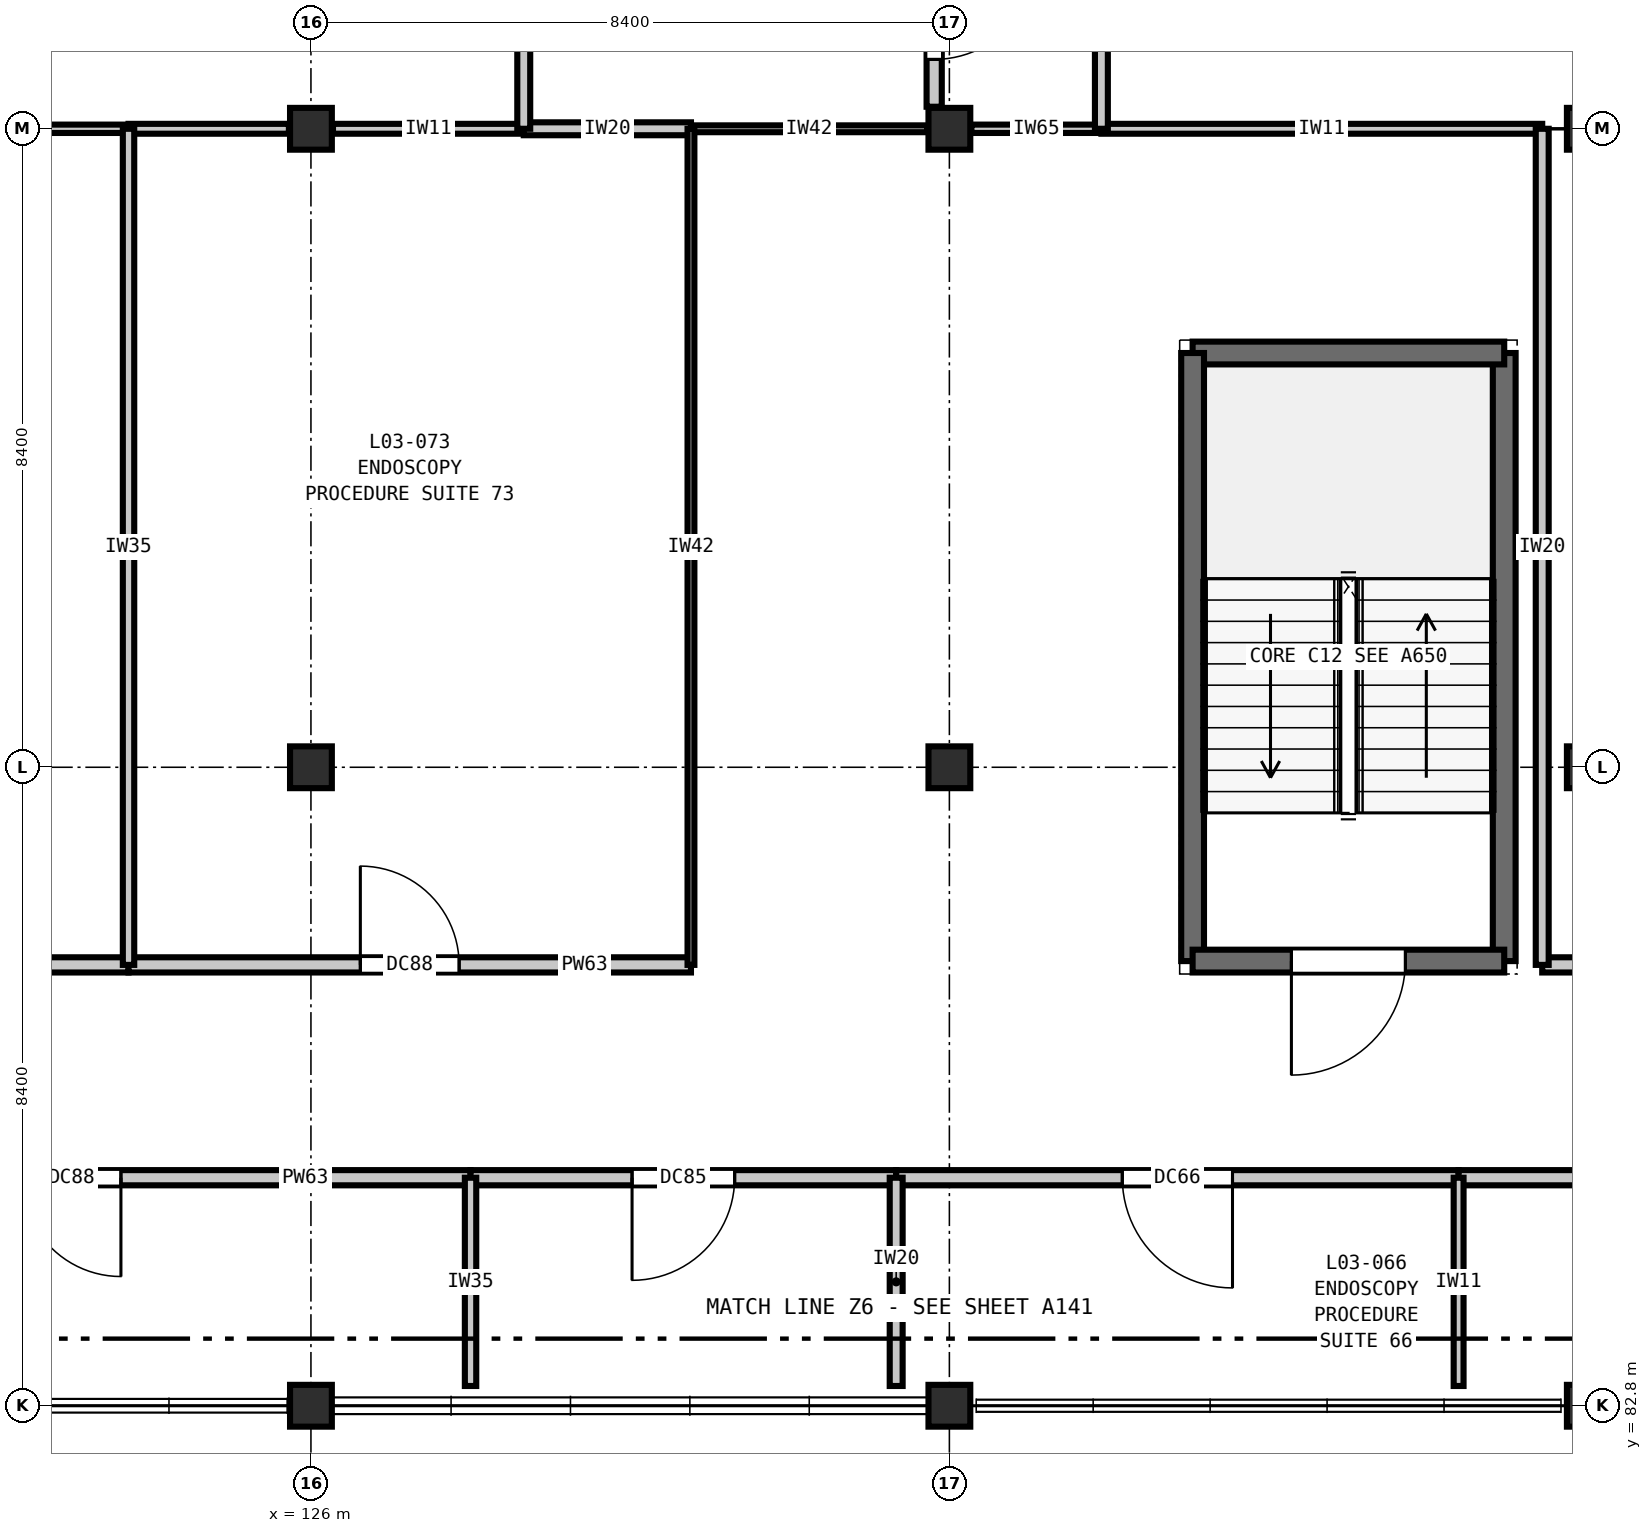
"""IFC4 building model, lengths in metres.
Left out: names, types, materials, properties, quantities, classifications, styles, units other than length and angle.
Written with IfcOpenShell. Run it as: python <this file> out.ifc"""

import sys

from ifc_helpers import new_model, si_unit, direction, frame, frame_2d, origin, origin_2d, place, context, subcontext, project, spatial, rectangle, extrude, element, fill, save


model = new_model("IFC4")
c1 = context("Model", 3, precision=1e-05, world=origin(), true_north=direction((0.0, 1.0)))
c2 = subcontext(c1, "Body", "Model", "MODEL_VIEW")
j1 = project(units=[si_unit("LENGTHUNIT", "METRE"), si_unit("PLANEANGLEUNIT", "RADIAN")], contexts=[c1])
p1 = place(None, origin())
s1 = spatial("IfcSite", under=j1, at=p1, CompositionType="ELEMENT")
p2 = place(p1, origin())
s2 = spatial("IfcBuilding", under=s1, at=p2, CompositionType="ELEMENT")
p3 = place(p2, frame((0.0, 0.0, 16.2)))
s3 = spatial("IfcBuildingStorey", under=s2, at=p3, CompositionType="ELEMENT", Elevation=16.2)
for number, where, z_axis, x_axis in (
    (1, (126.0, 82.8, 0.0), (0.0, 0.0, 1.0), (1.0, 0.0, 0.0)),
    (2, (126.0, 91.2, 0.0), (0.0, 0.0, 1.0), (1.0, 0.0, 0.0)),
    (3, (126.0, 99.6, 0.0), (0.0, 0.0, 1.0), (1.0, 0.0, 0.0)),
    (4, (134.4, 82.8, 0.0), (0.0, 0.0, 1.0), (1.0, 0.0, 0.0)),
    (5, (134.4, 91.2, 0.0), (0.0, 0.0, 1.0), (1.0, 0.0, 0.0)),
    (6, (134.4, 99.6, 0.0), (0.0, 0.0, 1.0), (1.0, 0.0, 0.0)),
    (7, (142.8, 82.8, 0.0), (0.0, 0.0, 1.0), (1.0, 0.0, 0.0)),
    (8, (142.8, 91.2, 0.0), (0.0, 0.0, 1.0), (1.0, 0.0, 0.0)),
    (9, (142.8, 99.6, 0.0), (0.0, 0.0, 1.0), (1.0, 0.0, 0.0)),
):
    element("IfcColumn", number, at=place(p3, frame(where, z_axis=z_axis, x_axis=x_axis)), inside=s3, PredefinedType="COLUMN", context=c2, shape_type="SweptSolid", body=[
        extrude(rectangle(XDim=0.55, YDim=0.55, at=origin_2d()), origin(), (0.0, 0.0, 1.0), 4.2),
    ])
p4 = place(p3, frame((141.7, 88.65, 0.0), z_axis=(0.0, 0.0, 1.0), x_axis=(0.0, 1.0, 0.0)))
e10 = element("IfcWall", 10, at=p4, inside=s3, PredefinedType="SHEAR", context=c2, shape_type="SweptSolid", body=[
    extrude(rectangle(XDim=8.0, YDim=0.3, at=frame_2d((4.0, 0.0))), origin(), (0.0, 0.0, 1.0), 4.2),
])
p5 = place(p3, frame((141.7, 96.65, 0.0), z_axis=(0.0, 0.0, 1.0), x_axis=(-1.0, 0.0, 0.0)))
e11 = element("IfcWall", 11, at=p5, inside=s3, PredefinedType="SHEAR", context=c2, shape_type="SweptSolid", body=[
    extrude(rectangle(XDim=4.1, YDim=0.3, at=frame_2d((2.05, 0.0))), origin(), (0.0, 0.0, 1.0), 4.2),
])
p6 = place(p3, frame((137.6, 96.65, 0.0), z_axis=(0.0, 0.0, 1.0), x_axis=(0.0, -1.0, 0.0)))
e12 = element("IfcWall", 12, at=p6, inside=s3, PredefinedType="SHEAR", context=c2, shape_type="SweptSolid", body=[
    extrude(rectangle(XDim=8.0, YDim=0.3, at=frame_2d((4.0, 0.0))), origin(), (0.0, 0.0, 1.0), 4.2),
])
p7 = place(p3, frame((137.6, 88.65, 0.0), z_axis=(0.0, 0.0, 1.0), x_axis=(1.0, 0.0, 0.0)))
e13 = element("IfcWall", 13, at=p7, inside=s3, PredefinedType="SHEAR", context=c2, shape_type="SweptSolid", body=[
    extrude(rectangle(XDim=4.1, YDim=0.3, at=frame_2d((2.05, 0.0))), origin(), (0.0, 0.0, 1.0), 4.2),
])
p8 = place(p7, frame((1.3, 0.0, 0.0)))
e14 = element("IfcOpeningElement", 14, at=p8, cuts=e13, PredefinedType="OPENING", context=c2, shape_type="SweptSolid", body=[
    extrude(rectangle(XDim=1.5, YDim=2.2, at=frame_2d((0.75, 1.1))), frame((0.0, 0.16, 0.0), z_axis=(0.0, -1.0, 0.0), x_axis=(1.0, 0.0, 0.0)), (0.0, 0.0, 1.0), 0.32),
])
p9 = place(p3, frame((117.6, 85.8, 0.0), z_axis=(0.0, 0.0, 1.0), x_axis=(1.0, 0.0, 0.0)))
e15 = element("IfcWall", 15, at=p9, inside=s3, PredefinedType="PARTITIONING", context=c2, shape_type="SweptSolid", body=[
    extrude(rectangle(XDim=10.5, YDim=0.2, at=frame_2d((5.25, 0.0))), origin(), (0.0, 0.0, 1.0), 3.89),
])
p10 = place(p9, frame((4.6, 0.0, 0.0)))
e16 = element("IfcOpeningElement", 16, at=p10, cuts=e15, PredefinedType="OPENING", context=c2, shape_type="SweptSolid", body=[
    extrude(rectangle(XDim=1.3, YDim=2.2, at=frame_2d((0.65, 1.1))), frame((0.0, 0.11, 0.0), z_axis=(0.0, -1.0, 0.0), x_axis=(1.0, 0.0, 0.0)), (0.0, 0.0, 1.0), 0.22),
])
p11 = place(p3, frame((128.1, 85.8, 0.0), z_axis=(0.0, 0.0, 1.0), x_axis=(1.0, 0.0, 0.0)))
e17 = element("IfcWall", 17, at=p11, inside=s3, PredefinedType="PARTITIONING", context=c2, shape_type="SweptSolid", body=[
    extrude(rectangle(XDim=5.6, YDim=0.2, at=frame_2d((2.8, 0.0))), origin(), (0.0, 0.0, 1.0), 3.89),
])
p12 = place(p11, frame((2.125, 0.0, 0.0)))
e18 = element("IfcOpeningElement", 18, at=p12, cuts=e17, PredefinedType="OPENING", context=c2, shape_type="SweptSolid", body=[
    extrude(rectangle(XDim=1.35, YDim=2.2, at=frame_2d((0.675, 1.1))), frame((0.0, 0.11, 0.0), z_axis=(0.0, -1.0, 0.0), x_axis=(1.0, 0.0, 0.0)), (0.0, 0.0, 1.0), 0.22),
])
p13 = place(p3, frame((133.7, 85.8, 0.0), z_axis=(0.0, 0.0, 1.0), x_axis=(1.0, 0.0, 0.0)))
e19 = element("IfcWall", 19, at=p13, inside=s3, PredefinedType="PARTITIONING", context=c2, shape_type="SweptSolid", body=[
    extrude(rectangle(XDim=7.4, YDim=0.2, at=frame_2d((3.7, 0.0))), origin(), (0.0, 0.0, 1.0), 3.89),
])
p14 = place(p13, frame((2.975, 0.0, 0.0)))
e20 = element("IfcOpeningElement", 20, at=p14, cuts=e19, PredefinedType="OPENING", context=c2, shape_type="SweptSolid", body=[
    extrude(rectangle(XDim=1.45, YDim=2.25, at=frame_2d((0.725, 1.125))), frame((0.0, 0.11, 0.0), z_axis=(0.0, -1.0, 0.0), x_axis=(1.0, 0.0, 0.0)), (0.0, 0.0, 1.0), 0.22),
])
p15 = place(p3, frame((141.1, 85.8, 0.0), z_axis=(0.0, 0.0, 1.0), x_axis=(1.0, 0.0, 0.0)))
e21 = element("IfcWall", 21, at=p15, inside=s3, PredefinedType="PARTITIONING", context=c2, shape_type="SweptSolid", body=[
    extrude(rectangle(XDim=10.1, YDim=0.2, at=frame_2d((5.05, 0.0))), origin(), (0.0, 0.0, 1.0), 3.89),
])
p16 = place(p15, frame((4.275, 0.0, 0.0)))
e22 = element("IfcOpeningElement", 22, at=p16, cuts=e21, PredefinedType="OPENING", context=c2, shape_type="SweptSolid", body=[
    extrude(rectangle(XDim=1.55, YDim=2.25, at=frame_2d((0.775, 1.125))), frame((0.0, 0.11, 0.0), z_axis=(0.0, -1.0, 0.0), x_axis=(1.0, 0.0, 0.0)), (0.0, 0.0, 1.0), 0.22),
])
p17 = place(p3, frame((118.0, 88.6, 0.0), z_axis=(0.0, 0.0, 1.0), x_axis=(1.0, 0.0, 0.0)))
e23 = element("IfcWall", 23, at=p17, inside=s3, PredefinedType="PARTITIONING", context=c2, shape_type="SweptSolid", body=[
    extrude(rectangle(XDim=5.6, YDim=0.2, at=frame_2d((2.8, 0.0))), origin(), (0.0, 0.0, 1.0), 3.89),
])
p18 = place(p17, frame((2.175, 0.0, 0.0)))
e24 = element("IfcOpeningElement", 24, at=p18, cuts=e23, PredefinedType="OPENING", context=c2, shape_type="SweptSolid", body=[
    extrude(rectangle(XDim=1.25, YDim=2.15, at=frame_2d((0.625, 1.075))), frame((0.0, 0.11, 0.0), z_axis=(0.0, -1.0, 0.0), x_axis=(1.0, 0.0, 0.0)), (0.0, 0.0, 1.0), 0.22),
])
p19 = place(p3, frame((123.6, 88.6, 0.0), z_axis=(0.0, 0.0, 1.0), x_axis=(1.0, 0.0, 0.0)))
e25 = element("IfcWall", 25, at=p19, inside=s3, PredefinedType="PARTITIONING", context=c2, shape_type="SweptSolid", body=[
    extrude(rectangle(XDim=7.4, YDim=0.2, at=frame_2d((3.7, 0.0))), origin(), (0.0, 0.0, 1.0), 3.89),
])
p20 = place(p19, frame((3.05, 0.0, 0.0)))
e26 = element("IfcOpeningElement", 26, at=p20, cuts=e25, PredefinedType="OPENING", context=c2, shape_type="SweptSolid", body=[
    extrude(rectangle(XDim=1.3, YDim=2.2, at=frame_2d((0.65, 1.1))), frame((0.0, 0.11, 0.0), z_axis=(0.0, -1.0, 0.0), x_axis=(1.0, 0.0, 0.0)), (0.0, 0.0, 1.0), 0.22),
])
p21 = place(p3, frame((142.2, 88.6, 0.0), z_axis=(0.0, 0.0, 1.0), x_axis=(1.0, 0.0, 0.0)))
e27 = element("IfcWall", 27, at=p21, inside=s3, PredefinedType="PARTITIONING", context=c2, shape_type="SweptSolid", body=[
    extrude(rectangle(XDim=9.0, YDim=0.2, at=frame_2d((4.5, 0.0))), origin(), (0.0, 0.0, 1.0), 3.89),
])
p22 = place(p21, frame((3.825, 0.0, 0.0)))
e28 = element("IfcOpeningElement", 28, at=p22, cuts=e27, PredefinedType="OPENING", context=c2, shape_type="SweptSolid", body=[
    extrude(rectangle(XDim=1.35, YDim=2.2, at=frame_2d((0.675, 1.1))), frame((0.0, 0.11, 0.0), z_axis=(0.0, -1.0, 0.0), x_axis=(1.0, 0.0, 0.0)), (0.0, 0.0, 1.0), 0.22),
])
p23 = place(p3, frame((120.4, 99.6, 0.0), z_axis=(0.0, 0.0, 1.0), x_axis=(1.0, 0.0, 0.0)))
e29 = element("IfcWall", 29, at=p23, inside=s3, PredefinedType="PARTITIONING", context=c2, shape_type="SweptSolid", body=[
    extrude(rectangle(XDim=3.2, YDim=0.11, at=frame_2d((1.6, 0.0))), origin(), (0.0, 0.0, 1.0), 3.535),
])
p24 = place(p3, frame((126.29, 99.6, 0.0), z_axis=(0.0, 0.0, 1.0), x_axis=(1.0, 0.0, 0.0)))
e30 = element("IfcWall", 30, at=p24, inside=s3, PredefinedType="PARTITIONING", context=c2, shape_type="SweptSolid", body=[
    extrude(rectangle(XDim=2.51, YDim=0.13, at=frame_2d((1.255, 0.0))), origin(), (0.0, 0.0, 1.0), 3.535),
])
p25 = place(p3, frame((123.6, 99.6, 0.0), z_axis=(0.0, 0.0, 1.0), x_axis=(1.0, 0.0, 0.0)))
e31 = element("IfcWall", 31, at=p25, inside=s3, PredefinedType="PARTITIONING", context=c2, shape_type="SweptSolid", body=[
    extrude(rectangle(XDim=2.11, YDim=0.13, at=frame_2d((1.055, 0.0))), origin(), (0.0, 0.0, 1.0), 3.535),
])
p26 = place(p3, frame((128.8, 99.6, 0.0), z_axis=(0.0, 0.0, 1.0), x_axis=(1.0, 0.0, 0.0)))
e32 = element("IfcWall", 32, at=p26, inside=s3, PredefinedType="PARTITIONING", context=c2, shape_type="SweptSolid", body=[
    extrude(rectangle(XDim=2.2, YDim=0.17, at=frame_2d((1.1, 0.0))), origin(), (0.0, 0.0, 1.0), 3.535),
])
p27 = place(p3, frame((131.0, 99.6, 0.0), z_axis=(0.0, 0.0, 1.0), x_axis=(1.0, 0.0, 0.0)))
e33 = element("IfcWall", 33, at=p27, inside=s3, PredefinedType="PARTITIONING", context=c2, shape_type="SweptSolid", body=[
    extrude(rectangle(XDim=3.11, YDim=0.09, at=frame_2d((1.555, 0.0))), origin(), (0.0, 0.0, 1.0), 3.535),
])
p28 = place(p3, frame((134.69, 99.6, 0.0), z_axis=(0.0, 0.0, 1.0), x_axis=(1.0, 0.0, 0.0)))
e34 = element("IfcWall", 34, at=p28, inside=s3, PredefinedType="PARTITIONING", context=c2, shape_type="SweptSolid", body=[
    extrude(rectangle(XDim=1.71, YDim=0.11, at=frame_2d((0.855, 0.0))), origin(), (0.0, 0.0, 1.0), 3.535),
])
p29 = place(p3, frame((136.4, 99.6, 0.0), z_axis=(0.0, 0.0, 1.0), x_axis=(1.0, 0.0, 0.0)))
e35 = element("IfcWall", 35, at=p29, inside=s3, PredefinedType="PARTITIONING", context=c2, shape_type="SweptSolid", body=[
    extrude(rectangle(XDim=5.8, YDim=0.13, at=frame_2d((2.9, 0.0))), origin(), (0.0, 0.0, 1.0), 3.535),
])
p30 = place(p3, frame((123.6, 88.6, 0.0), z_axis=(0.0, 0.0, 1.0), x_axis=(0.0, 1.0, 0.0)))
e36 = element("IfcWall", 36, at=p30, inside=s3, PredefinedType="PARTITIONING", context=c2, shape_type="SweptSolid", body=[
    extrude(rectangle(XDim=11.0, YDim=0.15, at=frame_2d((5.5, 0.0))), origin(), (0.0, 0.0, 1.0), 3.89),
])
p31 = place(p3, frame((128.1, 83.06, 0.0), z_axis=(0.0, 0.0, 1.0), x_axis=(0.0, 1.0, 0.0)))
e37 = element("IfcWall", 37, at=p31, inside=s3, PredefinedType="PARTITIONING", context=c2, shape_type="SweptSolid", body=[
    extrude(rectangle(XDim=2.74, YDim=0.15, at=frame_2d((1.37, 0.0))), origin(), (0.0, 0.0, 1.0), 3.89),
])
p32 = place(p3, frame((128.8, 99.6, 0.0), z_axis=(0.0, 0.0, 1.0), x_axis=(0.0, 1.0, 0.0)))
e38 = element("IfcWall", 38, at=p32, inside=s3, PredefinedType="PARTITIONING", context=c2, shape_type="SweptSolid", body=[
    extrude(rectangle(XDim=13.6, YDim=0.17, at=frame_2d((6.8, 0.0))), origin(), (0.0, 0.0, 1.0), 3.89),
])
p33 = place(p3, frame((131.0, 88.6, 0.0), z_axis=(0.0, 0.0, 1.0), x_axis=(0.0, 1.0, 0.0)))
e39 = element("IfcWall", 39, at=p33, inside=s3, PredefinedType="PARTITIONING", context=c2, shape_type="SweptSolid", body=[
    extrude(rectangle(XDim=11.0, YDim=0.09, at=frame_2d((5.5, 0.0))), origin(), (0.0, 0.0, 1.0), 3.89),
])
p34 = place(p3, frame((133.7, 83.06, 0.0), z_axis=(0.0, 0.0, 1.0), x_axis=(0.0, 1.0, 0.0)))
e40 = element("IfcWall", 40, at=p34, inside=s3, PredefinedType="PARTITIONING", context=c2, shape_type="SweptSolid", body=[
    extrude(rectangle(XDim=2.74, YDim=0.17, at=frame_2d((1.37, 0.0))), origin(), (0.0, 0.0, 1.0), 3.89),
])
p35 = place(p3, frame((134.2, 99.89, 0.0), z_axis=(0.0, 0.0, 1.0), x_axis=(0.0, 1.0, 0.0)))
e41 = element("IfcWall", 41, at=p35, inside=s3, PredefinedType="PARTITIONING", context=c2, shape_type="SweptSolid", body=[
    extrude(rectangle(XDim=2.595, YDim=0.2, at=frame_2d((1.298, 0.0))), origin(), (0.0, 0.0, 1.0), 3.585),
])
p36 = place(p35, frame((0.623, 0.0, 0.0)))
e42 = element("IfcOpeningElement", 42, at=p36, cuts=e41, PredefinedType="OPENING", context=c2, shape_type="SweptSolid", body=[
    extrude(rectangle(XDim=1.35, YDim=2.2, at=frame_2d((0.675, 1.1))), frame((0.0, 0.11, 0.0), z_axis=(0.0, -1.0, 0.0), x_axis=(1.0, 0.0, 0.0)), (0.0, 0.0, 1.0), 0.22),
])
p37 = place(p3, frame((136.4, 99.6, 0.0), z_axis=(0.0, 0.0, 1.0), x_axis=(0.0, 1.0, 0.0)))
e43 = element("IfcWall", 43, at=p37, inside=s3, PredefinedType="PARTITIONING", context=c2, shape_type="SweptSolid", body=[
    extrude(rectangle(XDim=6.8, YDim=0.17, at=frame_2d((3.4, 0.0))), origin(), (0.0, 0.0, 1.0), 3.89),
])
p38 = place(p3, frame((141.1, 83.06, 0.0), z_axis=(0.0, 0.0, 1.0), x_axis=(0.0, 1.0, 0.0)))
e44 = element("IfcWall", 44, at=p38, inside=s3, PredefinedType="PARTITIONING", context=c2, shape_type="SweptSolid", body=[
    extrude(rectangle(XDim=2.74, YDim=0.13, at=frame_2d((1.37, 0.0))), origin(), (0.0, 0.0, 1.0), 3.89),
])
p39 = place(p3, frame((142.2, 88.6, 0.0), z_axis=(0.0, 0.0, 1.0), x_axis=(0.0, 1.0, 0.0)))
e45 = element("IfcWall", 45, at=p39, inside=s3, PredefinedType="PARTITIONING", context=c2, shape_type="SweptSolid", body=[
    extrude(rectangle(XDim=11.0, YDim=0.17, at=frame_2d((5.5, 0.0))), origin(), (0.0, 0.0, 1.0), 3.89),
])
p40 = place(p8, frame((1.5, 0.0, 0.0), z_axis=(0.0, 0.0, 1.0), x_axis=(-1.0, 0.0, 0.0)))
e46 = element("IfcDoor", 46, at=p40, inside=s3, OperationType="SINGLE_SWING_RIGHT", PredefinedType="DOOR", context=c2, shape_type="SweptSolid", body=[
    extrude(rectangle(XDim=1.5, YDim=2.2, at=frame_2d((0.75, 1.1))), frame((0.0, 0.025, 0.0), z_axis=(0.0, -1.0, 0.0), x_axis=(1.0, 0.0, 0.0)), (0.0, 0.0, 1.0), 0.05),
])
fill(e14, e46)
p41 = place(p10, frame((1.3, 0.0, 0.0), z_axis=(0.0, 0.0, 1.0), x_axis=(-1.0, 0.0, 0.0)))
e47 = element("IfcDoor", 47, at=p41, inside=s3, OperationType="SINGLE_SWING_LEFT", PredefinedType="DOOR", context=c2, shape_type="SweptSolid", body=[
    extrude(rectangle(XDim=1.3, YDim=2.2, at=frame_2d((0.65, 1.1))), frame((0.0, 0.025, 0.0), z_axis=(0.0, -1.0, 0.0), x_axis=(1.0, 0.0, 0.0)), (0.0, 0.0, 1.0), 0.05),
])
fill(e16, e47)
p42 = place(p12, frame((1.35, 0.0, 0.0), z_axis=(0.0, 0.0, 1.0), x_axis=(-1.0, 0.0, 0.0)))
e48 = element("IfcDoor", 48, at=p42, inside=s3, OperationType="SINGLE_SWING_RIGHT", PredefinedType="DOOR", context=c2, shape_type="SweptSolid", body=[
    extrude(rectangle(XDim=1.35, YDim=2.2, at=frame_2d((0.675, 1.1))), frame((0.0, 0.025, 0.0), z_axis=(0.0, -1.0, 0.0), x_axis=(1.0, 0.0, 0.0)), (0.0, 0.0, 1.0), 0.05),
])
fill(e18, e48)
p43 = place(p14, frame((1.45, 0.0, 0.0), z_axis=(0.0, 0.0, 1.0), x_axis=(-1.0, 0.0, 0.0)))
e49 = element("IfcDoor", 49, at=p43, inside=s3, OperationType="SINGLE_SWING_LEFT", PredefinedType="DOOR", context=c2, shape_type="SweptSolid", body=[
    extrude(rectangle(XDim=1.45, YDim=2.25, at=frame_2d((0.725, 1.125))), frame((0.0, 0.025, 0.0), z_axis=(0.0, -1.0, 0.0), x_axis=(1.0, 0.0, 0.0)), (0.0, 0.0, 1.0), 0.05),
])
fill(e20, e49)
p44 = place(p20, origin())
e50 = element("IfcDoor", 50, at=p44, inside=s3, OperationType="SINGLE_SWING_LEFT", PredefinedType="DOOR", context=c2, shape_type="SweptSolid", body=[
    extrude(rectangle(XDim=1.3, YDim=2.2, at=frame_2d((0.65, 1.1))), frame((0.0, 0.025, 0.0), z_axis=(0.0, -1.0, 0.0), x_axis=(1.0, 0.0, 0.0)), (0.0, 0.0, 1.0), 0.05),
])
fill(e26, e50)
p45 = place(p36, frame((1.35, 0.0, 0.0), z_axis=(0.0, 0.0, 1.0), x_axis=(-1.0, 0.0, 0.0)))
e51 = element("IfcDoor", 51, at=p45, inside=s3, OperationType="SINGLE_SWING_LEFT", PredefinedType="DOOR", context=c2, shape_type="SweptSolid", body=[
    extrude(rectangle(XDim=1.35, YDim=2.2, at=frame_2d((0.675, 1.1))), frame((0.0, 0.025, 0.0), z_axis=(0.0, -1.0, 0.0), x_axis=(1.0, 0.0, 0.0)), (0.0, 0.0, 1.0), 0.05),
])
fill(e42, e51)
save(model, sys.argv[1])
